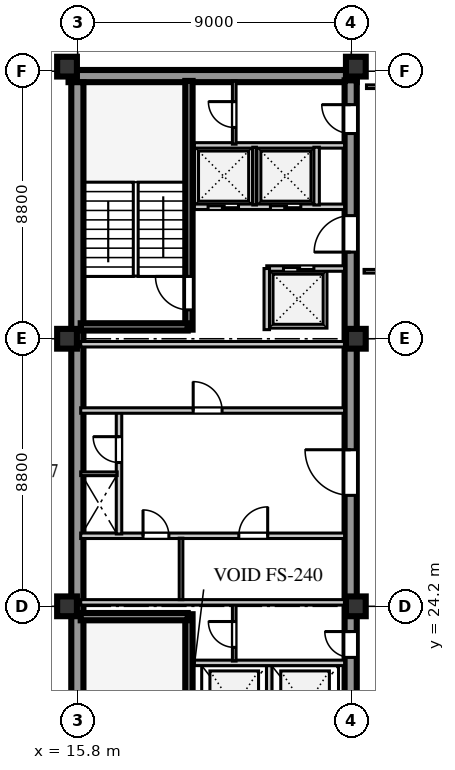
"""IFC4 building model, lengths in metres.
Left out: names, types, materials, properties, quantities, classifications, styles, units other than length and angle.
Written with IfcOpenShell. Run it as: python <this file> out.ifc"""

import sys

from ifc_helpers import new_model, si_unit, direction, frame, frame_2d, origin, origin_2d, place, context, subcontext, project, spatial, rectangle, extrude, element, fill, save


model = new_model("IFC4")
c1 = context("Model", 3, precision=1e-05, world=origin(), true_north=direction((0.0, 1.0)))
c2 = subcontext(c1, "Body", "Model", "MODEL_VIEW")
j1 = project(units=[si_unit("LENGTHUNIT", "METRE"), si_unit("PLANEANGLEUNIT", "RADIAN")], contexts=[c1])
p1 = place(None, origin())
s1 = spatial("IfcSite", under=j1, at=p1, CompositionType="ELEMENT")
p2 = place(p1, origin())
s2 = spatial("IfcBuilding", under=s1, at=p2, CompositionType="ELEMENT")
p3 = place(p2, frame((0.0, 0.0, 288.2)))
s3 = spatial("IfcBuildingStorey", under=s2, at=p3, CompositionType="ELEMENT", Elevation=288.2)
p4 = place(p3, frame((15.5, 41.64, 0.0), z_axis=(0.0, 0.0, 1.0), x_axis=(1.0, 0.0, 0.0)))
e1 = element("IfcWall", 1, at=p4, inside=s3, PredefinedType="SHEAR", context=c2, shape_type="SweptSolid", body=[
    extrude(rectangle(XDim=9.48, YDim=0.4, at=frame_2d((4.74, 0.0))), origin(), (0.0, 0.0, 1.0), 3.66),
])
p5 = place(p3, frame((15.79, 15.81, 0.0), z_axis=(0.0, 0.0, 1.0), x_axis=(0.0, 1.0, 0.0)))
e2 = element("IfcWall", 2, at=p5, inside=s3, PredefinedType="SHEAR", context=c2, shape_type="SweptSolid", body=[
    extrude(rectangle(XDim=25.63, YDim=0.4, at=frame_2d((12.815, 0.0))), origin(), (0.0, 0.0, 1.0), 3.66),
])
p6 = place(p3, frame((24.78, 15.74, 0.0), z_axis=(0.0, 0.0, 1.0), x_axis=(0.0, 1.0, 0.0)))
e3 = element("IfcWall", 3, at=p6, inside=s3, PredefinedType="SHEAR", context=c2, shape_type="SweptSolid", body=[
    extrude(rectangle(XDim=25.76, YDim=0.4, at=frame_2d((12.88, 0.0))), origin(), (0.0, 0.0, 1.0), 3.66),
])
p7 = place(p6, frame((1.61, 0.0, 0.0)))
e4 = element("IfcOpeningElement", 4, at=p7, cuts=e3, PredefinedType="OPENING", context=c2, shape_type="SweptSolid", body=[
    extrude(rectangle(XDim=1.2, YDim=2.1, at=frame_2d((0.6, 1.05))), frame((0.0, 0.21, 0.0), z_axis=(0.0, -1.0, 0.0), x_axis=(1.0, 0.0, 0.0)), (0.0, 0.0, 1.0), 0.42),
])
p8 = place(p6, frame((6.78, 0.0, 0.0)))
e5 = element("IfcOpeningElement", 5, at=p8, cuts=e3, PredefinedType="OPENING", context=c2, shape_type="SweptSolid", body=[
    extrude(rectangle(XDim=0.85, YDim=2.06, at=frame_2d((0.425, 1.03))), frame((0.0, 0.21, 0.0), z_axis=(0.0, -1.0, 0.0), x_axis=(1.0, 0.0, 0.0)), (0.0, 0.0, 1.0), 0.42),
])
p9 = place(p6, frame((12.11, 0.0, 0.0)))
e6 = element("IfcOpeningElement", 6, at=p9, cuts=e3, PredefinedType="OPENING", context=c2, shape_type="SweptSolid", body=[
    extrude(rectangle(XDim=1.5, YDim=2.12, at=frame_2d((0.75, 1.06))), frame((0.0, 0.21, 0.0), z_axis=(0.0, -1.0, 0.0), x_axis=(1.0, 0.0, 0.0)), (0.0, 0.0, 1.0), 0.42),
])
p10 = place(p6, frame((20.11, 0.0, 0.0)))
e7 = element("IfcOpeningElement", 7, at=p10, cuts=e3, PredefinedType="OPENING", context=c2, shape_type="SweptSolid", body=[
    extrude(rectangle(XDim=1.2, YDim=2.12, at=frame_2d((0.6, 1.06))), frame((0.0, 0.21, 0.0), z_axis=(0.0, -1.0, 0.0), x_axis=(1.0, 0.0, 0.0)), (0.0, 0.0, 1.0), 0.42),
])
p11 = place(p6, frame((24.01, 0.0, 0.0)))
e8 = element("IfcOpeningElement", 8, at=p11, cuts=e3, PredefinedType="OPENING", context=c2, shape_type="SweptSolid", body=[
    extrude(rectangle(XDim=0.95, YDim=2.1, at=frame_2d((0.475, 1.05))), frame((0.0, 0.21, 0.0), z_axis=(0.0, -1.0, 0.0), x_axis=(1.0, 0.0, 0.0)), (0.0, 0.0, 1.0), 0.42),
])
for number, where, z_axis, x_axis in (
    (9, (15.45, 24.2, 0.0), (0.0, 0.0, 1.0), (1.0, 0.0, 0.0)),
    (10, (15.45, 33.0, 0.0), (0.0, 0.0, 1.0), (1.0, 0.0, 0.0)),
    (11, (15.45, 41.95, 0.0), (0.0, 0.0, 1.0), (1.0, 0.0, 0.0)),
    (12, (24.95, 24.2, 0.0), (0.0, 0.0, 1.0), (1.0, 0.0, 0.0)),
    (13, (24.95, 33.0, 0.0), (0.0, 0.0, 1.0), (1.0, 0.0, 0.0)),
    (14, (24.95, 41.95, 0.0), (0.0, 0.0, 1.0), (1.0, 0.0, 0.0)),
):
    element("IfcColumn", number, at=place(p3, frame(where, z_axis=z_axis, x_axis=x_axis)), inside=s3, PredefinedType="COLUMN", context=c2, shape_type="SweptSolid", body=[
        extrude(rectangle(XDim=0.65, YDim=0.65, at=origin_2d()), origin(), (0.0, 0.0, 1.0), 3.66),
    ])
p12 = place(p3, frame((19.46, 15.74, 0.0), z_axis=(0.0, 0.0, 1.0), x_axis=(0.0, 1.0, 0.0)))
e15 = element("IfcWall", 15, at=p12, inside=s3, PredefinedType="SHEAR", context=c2, shape_type="SweptSolid", body=[
    extrude(rectangle(XDim=8.2, YDim=0.24, at=frame_2d((4.1, 0.0))), origin(), (0.0, 0.0, 1.0), 3.9),
])
p13 = place(p12, frame((0.45, 0.0, 0.0)))
e16 = element("IfcOpeningElement", 16, at=p13, cuts=e15, PredefinedType="OPENING", context=c2, shape_type="SweptSolid", body=[
    extrude(rectangle(XDim=1.1, YDim=2.1, at=frame_2d((0.55, 1.05))), frame((0.0, 0.13, 0.0), z_axis=(0.0, -1.0, 0.0), x_axis=(1.0, 0.0, 0.0)), (0.0, 0.0, 1.0), 0.26),
])
p14 = place(p3, frame((15.9, 23.86, 0.0), z_axis=(0.0, 0.0, 1.0), x_axis=(1.0, 0.0, 0.0)))
e17 = element("IfcWall", 17, at=p14, inside=s3, PredefinedType="SHEAR", context=c2, shape_type="SweptSolid", body=[
    extrude(rectangle(XDim=3.52, YDim=0.24, at=frame_2d((1.76, 0.0))), origin(), (0.0, 0.0, 1.0), 3.9),
])
p15 = place(p3, frame((22.1, 19.51, 0.0), z_axis=(0.0, 0.0, 1.0), x_axis=(0.0, 1.0, 0.0)))
e18 = element("IfcWall", 18, at=p15, inside=s3, PredefinedType="SOLIDWALL", context=c2, shape_type="SweptSolid", body=[
    extrude(rectangle(XDim=2.74, YDim=0.18, at=frame_2d((1.37, 0.0))), origin(), (0.0, 0.0, 1.0), 3.66),
])
p16 = place(p3, frame((19.64, 22.34, 0.0), z_axis=(0.0, 0.0, 1.0), x_axis=(1.0, 0.0, 0.0)))
e19 = element("IfcWall", 19, at=p16, inside=s3, PredefinedType="SOLIDWALL", context=c2, shape_type="SweptSolid", body=[
    extrude(rectangle(XDim=4.94, YDim=0.18, at=frame_2d((2.47, 0.0))), origin(), (0.0, 0.0, 1.0), 3.66),
])
p17 = place(p3, frame((20.95, 22.4, 0.0), z_axis=(0.0, 0.0, 1.0), x_axis=(0.0, 1.0, 0.0)))
e20 = element("IfcWall", 20, at=p17, inside=s3, PredefinedType="PARTITIONING", context=c2, shape_type="SweptSolid", body=[
    extrude(rectangle(XDim=1.88, YDim=0.12, at=frame_2d((0.94, 0.0))), origin(), (0.0, 0.0, 1.0), 3.66),
])
p18 = place(p17, frame((0.45, 0.0, 0.0)))
e21 = element("IfcOpeningElement", 21, at=p18, cuts=e20, PredefinedType="OPENING", context=c2, shape_type="SweptSolid", body=[
    extrude(rectangle(XDim=0.85, YDim=2.06, at=frame_2d((0.425, 1.03))), frame((0.0, 0.07, 0.0), z_axis=(0.0, -1.0, 0.0), x_axis=(1.0, 0.0, 0.0)), (0.0, 0.0, 1.0), 0.14),
])
p19 = place(p3, frame((15.9, 26.52, 0.0), z_axis=(0.0, 0.0, 1.0), x_axis=(1.0, 0.0, 0.0)))
e22 = element("IfcWall", 22, at=p19, inside=s3, PredefinedType="SOLIDWALL", context=c2, shape_type="SweptSolid", body=[
    extrude(rectangle(XDim=8.68, YDim=0.18, at=frame_2d((4.34, 0.0))), origin(), (0.0, 0.0, 1.0), 3.66),
])
p20 = place(p19, frame((2.05, 0.0, 0.0)))
e23 = element("IfcOpeningElement", 23, at=p20, cuts=e22, PredefinedType="OPENING", context=c2, shape_type="SweptSolid", body=[
    extrude(rectangle(XDim=0.85, YDim=2.06, at=frame_2d((0.425, 1.03))), frame((0.0, 0.1, 0.0), z_axis=(0.0, -1.0, 0.0), x_axis=(1.0, 0.0, 0.0)), (0.0, 0.0, 1.0), 0.2),
])
p21 = place(p19, frame((5.2, 0.0, 0.0)))
e24 = element("IfcOpeningElement", 24, at=p21, cuts=e22, PredefinedType="OPENING", context=c2, shape_type="SweptSolid", body=[
    extrude(rectangle(XDim=0.95, YDim=2.1, at=frame_2d((0.475, 1.05))), frame((0.0, 0.1, 0.0), z_axis=(0.0, -1.0, 0.0), x_axis=(1.0, 0.0, 0.0)), (0.0, 0.0, 1.0), 0.2),
])
p22 = place(p3, frame((15.9, 24.33, 0.0), z_axis=(0.0, 0.0, 1.0), x_axis=(1.0, 0.0, 0.0)))
e25 = element("IfcWall", 25, at=p22, inside=s3, PredefinedType="SOLIDWALL", context=c2, shape_type="SweptSolid", body=[
    extrude(rectangle(XDim=8.68, YDim=0.18, at=frame_2d((4.34, 0.0))), origin(), (0.0, 0.0, 1.0), 3.06),
])
p23 = place(p3, frame((19.2, 24.42, 0.0), z_axis=(0.0, 0.0, 1.0), x_axis=(0.0, 1.0, 0.0)))
e26 = element("IfcWall", 26, at=p23, inside=s3, PredefinedType="PARTITIONING", context=c2, shape_type="SweptSolid", body=[
    extrude(rectangle(XDim=2.02, YDim=0.12, at=frame_2d((1.01, 0.0))), origin(), (0.0, 0.0, 1.0), 3.66),
])
p24 = place(p3, frame((17.16, 26.58, 0.0), z_axis=(0.0, 0.0, 1.0), x_axis=(0.0, 1.0, 0.0)))
e27 = element("IfcWall", 27, at=p24, inside=s3, PredefinedType="SOLIDWALL", context=c2, shape_type="SweptSolid", body=[
    extrude(rectangle(XDim=4.02, YDim=0.18, at=frame_2d((2.01, 0.0))), origin(), (0.0, 0.0, 1.0), 3.66),
])
p25 = place(p24, frame((2.35, 0.0, 0.0)))
e28 = element("IfcOpeningElement", 28, at=p25, cuts=e27, PredefinedType="OPENING", context=c2, shape_type="SweptSolid", body=[
    extrude(rectangle(XDim=0.85, YDim=2.06, at=frame_2d((0.425, 1.03))), frame((0.0, 0.1, 0.0), z_axis=(0.0, -1.0, 0.0), x_axis=(1.0, 0.0, 0.0)), (0.0, 0.0, 1.0), 0.2),
])
p26 = place(p3, frame((15.9, 28.56, 0.0), z_axis=(0.0, 0.0, 1.0), x_axis=(1.0, 0.0, 0.0)))
e29 = element("IfcWall", 29, at=p26, inside=s3, PredefinedType="PARTITIONING", context=c2, shape_type="SweptSolid", body=[
    extrude(rectangle(XDim=1.2, YDim=0.12, at=frame_2d((0.6, 0.0))), origin(), (0.0, 0.0, 1.0), 3.66),
])
p27 = place(p3, frame((15.9, 30.64, 0.0), z_axis=(0.0, 0.0, 1.0), x_axis=(1.0, 0.0, 0.0)))
e30 = element("IfcWall", 30, at=p27, inside=s3, PredefinedType="SOLIDWALL", context=c2, shape_type="SweptSolid", body=[
    extrude(rectangle(XDim=8.68, YDim=0.18, at=frame_2d((4.34, 0.0))), origin(), (0.0, 0.0, 1.0), 3.66),
])
p28 = place(p27, frame((3.7, 0.0, 0.0)))
e31 = element("IfcOpeningElement", 31, at=p28, cuts=e30, PredefinedType="OPENING", context=c2, shape_type="SweptSolid", body=[
    extrude(rectangle(XDim=0.95, YDim=2.1, at=frame_2d((0.475, 1.05))), frame((0.0, 0.1, 0.0), z_axis=(0.0, -1.0, 0.0), x_axis=(1.0, 0.0, 0.0)), (0.0, 0.0, 1.0), 0.2),
])
p29 = place(p3, frame((15.9, 32.82, 0.0), z_axis=(0.0, 0.0, 1.0), x_axis=(1.0, 0.0, 0.0)))
e32 = element("IfcWall", 32, at=p29, inside=s3, PredefinedType="SOLIDWALL", context=c2, shape_type="SweptSolid", body=[
    extrude(rectangle(XDim=8.68, YDim=0.18, at=frame_2d((4.34, 0.0))), origin(), (0.0, 0.0, 1.0), 3.06),
])
p30 = place(p3, frame((19.46, 33.3, 0.0), z_axis=(0.0, 0.0, 1.0), x_axis=(0.0, 1.0, 0.0)))
e33 = element("IfcWall", 33, at=p30, inside=s3, PredefinedType="SHEAR", context=c2, shape_type="SweptSolid", body=[
    extrude(rectangle(XDim=8.18, YDim=0.24, at=frame_2d((4.09, 0.0))), origin(), (0.0, 0.0, 1.0), 3.9),
])
p31 = place(p30, frame((0.65, 0.0, 0.0)))
e34 = element("IfcOpeningElement", 34, at=p31, cuts=e33, PredefinedType="OPENING", context=c2, shape_type="SweptSolid", body=[
    extrude(rectangle(XDim=1.1, YDim=2.1, at=frame_2d((0.55, 1.05))), frame((0.0, 0.13, 0.0), z_axis=(0.0, -1.0, 0.0), x_axis=(1.0, 0.0, 0.0)), (0.0, 0.0, 1.0), 0.26),
])
p32 = place(p3, frame((15.9, 33.39, 0.0), z_axis=(0.0, 0.0, 1.0), x_axis=(1.0, 0.0, 0.0)))
e35 = element("IfcWall", 35, at=p32, inside=s3, PredefinedType="SHEAR", context=c2, shape_type="SweptSolid", body=[
    extrude(rectangle(XDim=3.52, YDim=0.24, at=frame_2d((1.76, 0.0))), origin(), (0.0, 0.0, 1.0), 3.9),
])
p33 = place(p3, frame((22.02, 35.31, 0.0), z_axis=(0.0, 0.0, 1.0), x_axis=(1.0, 0.0, 0.0)))
e36 = element("IfcWall", 36, at=p33, inside=s3, PredefinedType="SOLIDWALL", context=c2, shape_type="SweptSolid", body=[
    extrude(rectangle(XDim=2.56, YDim=0.18, at=frame_2d((1.28, 0.0))), origin(), (0.0, 0.0, 1.0), 3.66),
])
p34 = place(p33, frame((0.55, 0.0, 0.0)))
e37 = element("IfcOpeningElement", 37, at=p34, cuts=e36, PredefinedType="OPENING", context=c2, shape_type="SweptSolid", body=[
    extrude(rectangle(XDim=1.0, YDim=2.1, at=frame_2d((0.5, 1.05))), frame((0.0, 0.1, 0.0), z_axis=(0.0, -1.0, 0.0), x_axis=(1.0, 0.0, 0.0)), (0.0, 0.0, 1.0), 0.2),
])
p35 = place(p3, frame((22.02, 33.3, 0.0), z_axis=(0.0, 0.0, 1.0), x_axis=(0.0, 1.0, 0.0)))
e38 = element("IfcWall", 38, at=p35, inside=s3, PredefinedType="SOLIDWALL", context=c2, shape_type="SweptSolid", body=[
    extrude(rectangle(XDim=2.01, YDim=0.18, at=frame_2d((1.005, 0.0))), origin(), (0.0, 0.0, 1.0), 3.66),
])
p36 = place(p3, frame((19.64, 37.34, 0.0), z_axis=(0.0, 0.0, 1.0), x_axis=(1.0, 0.0, 0.0)))
e39 = element("IfcWall", 39, at=p36, inside=s3, PredefinedType="SOLIDWALL", context=c2, shape_type="SweptSolid", body=[
    extrude(rectangle(XDim=4.94, YDim=0.18, at=frame_2d((2.47, 0.0))), origin(), (0.0, 0.0, 1.0), 3.66),
])
p37 = place(p36, frame((0.45, 0.0, 0.0)))
e40 = element("IfcOpeningElement", 40, at=p37, cuts=e39, PredefinedType="OPENING", context=c2, shape_type="SweptSolid", body=[
    extrude(rectangle(XDim=1.0, YDim=2.1, at=frame_2d((0.5, 1.05))), frame((0.0, 0.1, 0.0), z_axis=(0.0, -1.0, 0.0), x_axis=(1.0, 0.0, 0.0)), (0.0, 0.0, 1.0), 0.2),
])
p38 = place(p36, frame((2.5, 0.0, 0.0)))
e41 = element("IfcOpeningElement", 41, at=p38, cuts=e39, PredefinedType="OPENING", context=c2, shape_type="SweptSolid", body=[
    extrude(rectangle(XDim=1.0, YDim=2.1, at=frame_2d((0.5, 1.05))), frame((0.0, 0.1, 0.0), z_axis=(0.0, -1.0, 0.0), x_axis=(1.0, 0.0, 0.0)), (0.0, 0.0, 1.0), 0.2),
])
p39 = place(p3, frame((19.64, 39.36, 0.0), z_axis=(0.0, 0.0, 1.0), x_axis=(1.0, 0.0, 0.0)))
e42 = element("IfcWall", 42, at=p39, inside=s3, PredefinedType="SOLIDWALL", context=c2, shape_type="SweptSolid", body=[
    extrude(rectangle(XDim=4.94, YDim=0.18, at=frame_2d((2.47, 0.0))), origin(), (0.0, 0.0, 1.0), 3.66),
])
p40 = place(p3, frame((21.62, 37.4, 0.0), z_axis=(0.0, 0.0, 1.0), x_axis=(0.0, 1.0, 0.0)))
e43 = element("IfcWall", 43, at=p40, inside=s3, PredefinedType="PARTITIONING", context=c2, shape_type="SweptSolid", body=[
    extrude(rectangle(XDim=1.9, YDim=0.12, at=frame_2d((0.95, 0.0))), origin(), (0.0, 0.0, 1.0), 3.66),
])
p41 = place(p3, frame((23.66, 37.4, 0.0), z_axis=(0.0, 0.0, 1.0), x_axis=(0.0, 1.0, 0.0)))
e44 = element("IfcWall", 44, at=p41, inside=s3, PredefinedType="SOLIDWALL", context=c2, shape_type="SweptSolid", body=[
    extrude(rectangle(XDim=1.9, YDim=0.18, at=frame_2d((0.95, 0.0))), origin(), (0.0, 0.0, 1.0), 3.66),
])
p42 = place(p3, frame((20.95, 39.4, 0.0), z_axis=(0.0, 0.0, 1.0), x_axis=(0.0, 1.0, 0.0)))
e45 = element("IfcWall", 45, at=p42, inside=s3, PredefinedType="PARTITIONING", context=c2, shape_type="SweptSolid", body=[
    extrude(rectangle(XDim=2.08, YDim=0.12, at=frame_2d((1.04, 0.0))), origin(), (0.0, 0.0, 1.0), 3.66),
])
p43 = place(p42, frame((0.55, 0.0, 0.0)))
e46 = element("IfcOpeningElement", 46, at=p43, cuts=e45, PredefinedType="OPENING", context=c2, shape_type="SweptSolid", body=[
    extrude(rectangle(XDim=0.85, YDim=2.06, at=frame_2d((0.425, 1.03))), frame((0.0, 0.07, 0.0), z_axis=(0.0, -1.0, 0.0), x_axis=(1.0, 0.0, 0.0)), (0.0, 0.0, 1.0), 0.14),
])
p44 = place(p3, frame((25.22, 35.22, 0.0), z_axis=(0.0, 0.0, 1.0), x_axis=(1.0, 0.0, 0.0)))
e47 = element("IfcWall", 47, at=p44, inside=s3, PredefinedType="PARTITIONING", context=c2, shape_type="SweptSolid", body=[
    extrude(rectangle(XDim=9.5, YDim=0.12, at=frame_2d((4.75, 0.0))), origin(), (0.0, 0.0, 1.0), 3.66),
])
p45 = place(p44, frame((1.1, 0.0, 0.0)))
e48 = element("IfcOpeningElement", 48, at=p45, cuts=e47, PredefinedType="OPENING", context=c2, shape_type="SweptSolid", body=[
    extrude(rectangle(XDim=0.95, YDim=2.1, at=frame_2d((0.475, 1.05))), frame((0.0, 0.07, 0.0), z_axis=(0.0, -1.0, 0.0), x_axis=(1.0, 0.0, 0.0)), (0.0, 0.0, 1.0), 0.14),
])
p46 = place(p3, frame((25.3, 41.29, 0.0), z_axis=(0.0, 0.0, 1.0), x_axis=(1.0, 0.0, 0.0)))
e49 = element("IfcWall", 49, at=p46, inside=s3, PredefinedType="PARTITIONING", context=c2, shape_type="SweptSolid", body=[
    extrude(rectangle(XDim=9.34, YDim=0.12, at=frame_2d((4.67, 0.0))), origin(), (0.0, 0.0, 1.0), 3.66),
])
p47 = place(p46, frame((0.6, 0.0, 0.0)))
e50 = element("IfcOpeningElement", 50, at=p47, cuts=e49, PredefinedType="OPENING", context=c2, shape_type="SweptSolid", body=[
    extrude(rectangle(XDim=0.85, YDim=2.08, at=frame_2d((0.425, 1.04))), frame((0.0, 0.07, 0.0), z_axis=(0.0, -1.0, 0.0), x_axis=(1.0, 0.0, 0.0)), (0.0, 0.0, 1.0), 0.14),
])
p48 = place(p46, frame((3.573, 0.0, 0.0)))
e51 = element("IfcOpeningElement", 51, at=p48, cuts=e49, PredefinedType="OPENING", context=c2, shape_type="SweptSolid", body=[
    extrude(rectangle(XDim=0.85, YDim=2.08, at=frame_2d((0.425, 1.04))), frame((0.0, 0.07, 0.0), z_axis=(0.0, -1.0, 0.0), x_axis=(1.0, 0.0, 0.0)), (0.0, 0.0, 1.0), 0.14),
])
p49 = place(p18, origin())
e52 = element("IfcDoor", 52, at=p49, inside=s3, OperationType="SINGLE_SWING_RIGHT", PredefinedType="DOOR", context=c2, shape_type="SweptSolid", body=[
    extrude(rectangle(XDim=0.85, YDim=2.06, at=frame_2d((0.425, 1.03))), frame((0.0, 0.025, 0.0), z_axis=(0.0, -1.0, 0.0), x_axis=(1.0, 0.0, 0.0)), (0.0, 0.0, 1.0), 0.05),
])
fill(e21, e52)
p50 = place(p8, frame((0.85, 0.0, 0.0), z_axis=(0.0, 0.0, 1.0), x_axis=(-1.0, 0.0, 0.0)))
e53 = element("IfcDoor", 53, at=p50, inside=s3, OperationType="SINGLE_SWING_LEFT", PredefinedType="DOOR", context=c2, shape_type="SweptSolid", body=[
    extrude(rectangle(XDim=0.85, YDim=2.06, at=frame_2d((0.425, 1.03))), frame((0.0, 0.025, 0.0), z_axis=(0.0, -1.0, 0.0), x_axis=(1.0, 0.0, 0.0)), (0.0, 0.0, 1.0), 0.05),
])
fill(e5, e53)
p51 = place(p20, origin())
e54 = element("IfcDoor", 54, at=p51, inside=s3, OperationType="SINGLE_SWING_LEFT", PredefinedType="DOOR", context=c2, shape_type="SweptSolid", body=[
    extrude(rectangle(XDim=0.85, YDim=2.06, at=frame_2d((0.425, 1.03))), frame((0.0, 0.025, 0.0), z_axis=(0.0, -1.0, 0.0), x_axis=(1.0, 0.0, 0.0)), (0.0, 0.0, 1.0), 0.05),
])
fill(e23, e54)
p52 = place(p21, origin())
e55 = element("IfcDoor", 55, at=p52, inside=s3, OperationType="SINGLE_SWING_RIGHT", PredefinedType="DOOR", context=c2, shape_type="SweptSolid", body=[
    extrude(rectangle(XDim=0.95, YDim=2.1, at=frame_2d((0.475, 1.05))), frame((0.0, 0.025, 0.0), z_axis=(0.0, -1.0, 0.0), x_axis=(1.0, 0.0, 0.0)), (0.0, 0.0, 1.0), 0.05),
])
fill(e24, e55)
p53 = place(p25, origin())
e56 = element("IfcDoor", 56, at=p53, inside=s3, OperationType="SINGLE_SWING_RIGHT", PredefinedType="DOOR", context=c2, shape_type="SweptSolid", body=[
    extrude(rectangle(XDim=0.85, YDim=2.06, at=frame_2d((0.425, 1.03))), frame((0.0, 0.025, 0.0), z_axis=(0.0, -1.0, 0.0), x_axis=(1.0, 0.0, 0.0)), (0.0, 0.0, 1.0), 0.05),
])
fill(e28, e56)
p54 = place(p9, frame((1.5, 0.0, 0.0), z_axis=(0.0, 0.0, 1.0), x_axis=(-1.0, 0.0, 0.0)))
e57 = element("IfcDoor", 57, at=p54, inside=s3, OperationType="SINGLE_SWING_LEFT", PredefinedType="DOOR", context=c2, shape_type="SweptSolid", body=[
    extrude(rectangle(XDim=1.5, YDim=2.12, at=frame_2d((0.75, 1.06))), frame((0.0, 0.025, 0.0), z_axis=(0.0, -1.0, 0.0), x_axis=(1.0, 0.0, 0.0)), (0.0, 0.0, 1.0), 0.05),
])
fill(e6, e57)
p55 = place(p28, frame((0.95, 0.0, 0.0), z_axis=(0.0, 0.0, 1.0), x_axis=(-1.0, 0.0, 0.0)))
e58 = element("IfcDoor", 58, at=p55, inside=s3, OperationType="SINGLE_SWING_RIGHT", PredefinedType="DOOR", context=c2, shape_type="SweptSolid", body=[
    extrude(rectangle(XDim=0.95, YDim=2.1, at=frame_2d((0.475, 1.05))), frame((0.0, 0.025, 0.0), z_axis=(0.0, -1.0, 0.0), x_axis=(1.0, 0.0, 0.0)), (0.0, 0.0, 1.0), 0.05),
])
fill(e31, e58)
p56 = place(p31, origin())
e59 = element("IfcDoor", 59, at=p56, inside=s3, OperationType="SINGLE_SWING_RIGHT", PredefinedType="DOOR", context=c2, shape_type="SweptSolid", body=[
    extrude(rectangle(XDim=1.1, YDim=2.1, at=frame_2d((0.55, 1.05))), frame((0.0, 0.025, 0.0), z_axis=(0.0, -1.0, 0.0), x_axis=(1.0, 0.0, 0.0)), (0.0, 0.0, 1.0), 0.05),
])
fill(e34, e59)
p57 = place(p10, frame((1.2, 0.0, 0.0), z_axis=(0.0, 0.0, 1.0), x_axis=(-1.0, 0.0, 0.0)))
e60 = element("IfcDoor", 60, at=p57, inside=s3, OperationType="SINGLE_SWING_RIGHT", PredefinedType="DOOR", context=c2, shape_type="SweptSolid", body=[
    extrude(rectangle(XDim=1.2, YDim=2.12, at=frame_2d((0.6, 1.06))), frame((0.0, 0.025, 0.0), z_axis=(0.0, -1.0, 0.0), x_axis=(1.0, 0.0, 0.0)), (0.0, 0.0, 1.0), 0.05),
])
fill(e7, e60)
p58 = place(p37, frame((1.0, 0.0, 0.0), z_axis=(0.0, 0.0, 1.0), x_axis=(-1.0, 0.0, 0.0)))
e61 = element("IfcDoor", 61, at=p58, inside=s3, OperationType="DOUBLE_DOOR_SLIDING", PredefinedType="DOOR", context=c2, shape_type="SweptSolid", body=[
    extrude(rectangle(XDim=1.0, YDim=2.1, at=frame_2d((0.5, 1.05))), frame((0.0, 0.025, 0.0), z_axis=(0.0, -1.0, 0.0), x_axis=(1.0, 0.0, 0.0)), (0.0, 0.0, 1.0), 0.05),
])
fill(e40, e61)
p59 = place(p38, frame((1.0, 0.0, 0.0), z_axis=(0.0, 0.0, 1.0), x_axis=(-1.0, 0.0, 0.0)))
e62 = element("IfcDoor", 62, at=p59, inside=s3, OperationType="DOUBLE_DOOR_SLIDING", PredefinedType="DOOR", context=c2, shape_type="SweptSolid", body=[
    extrude(rectangle(XDim=1.0, YDim=2.1, at=frame_2d((0.5, 1.05))), frame((0.0, 0.025, 0.0), z_axis=(0.0, -1.0, 0.0), x_axis=(1.0, 0.0, 0.0)), (0.0, 0.0, 1.0), 0.05),
])
fill(e41, e62)
p60 = place(p34, origin())
e63 = element("IfcDoor", 63, at=p60, inside=s3, OperationType="DOUBLE_DOOR_SLIDING", PredefinedType="DOOR", context=c2, shape_type="SweptSolid", body=[
    extrude(rectangle(XDim=1.0, YDim=2.1, at=frame_2d((0.5, 1.05))), frame((0.0, 0.025, 0.0), z_axis=(0.0, -1.0, 0.0), x_axis=(1.0, 0.0, 0.0)), (0.0, 0.0, 1.0), 0.05),
])
fill(e37, e63)
p61 = place(p43, origin())
e64 = element("IfcDoor", 64, at=p61, inside=s3, OperationType="SINGLE_SWING_RIGHT", PredefinedType="DOOR", context=c2, shape_type="SweptSolid", body=[
    extrude(rectangle(XDim=0.85, YDim=2.06, at=frame_2d((0.425, 1.03))), frame((0.0, 0.025, 0.0), z_axis=(0.0, -1.0, 0.0), x_axis=(1.0, 0.0, 0.0)), (0.0, 0.0, 1.0), 0.05),
])
fill(e46, e64)
p62 = place(p11, frame((0.95, 0.0, 0.0), z_axis=(0.0, 0.0, 1.0), x_axis=(-1.0, 0.0, 0.0)))
e65 = element("IfcDoor", 65, at=p62, inside=s3, OperationType="SINGLE_SWING_LEFT", PredefinedType="DOOR", context=c2, shape_type="SweptSolid", body=[
    extrude(rectangle(XDim=0.95, YDim=2.1, at=frame_2d((0.475, 1.05))), frame((0.0, 0.025, 0.0), z_axis=(0.0, -1.0, 0.0), x_axis=(1.0, 0.0, 0.0)), (0.0, 0.0, 1.0), 0.05),
])
fill(e8, e65)
save(model, sys.argv[1])
